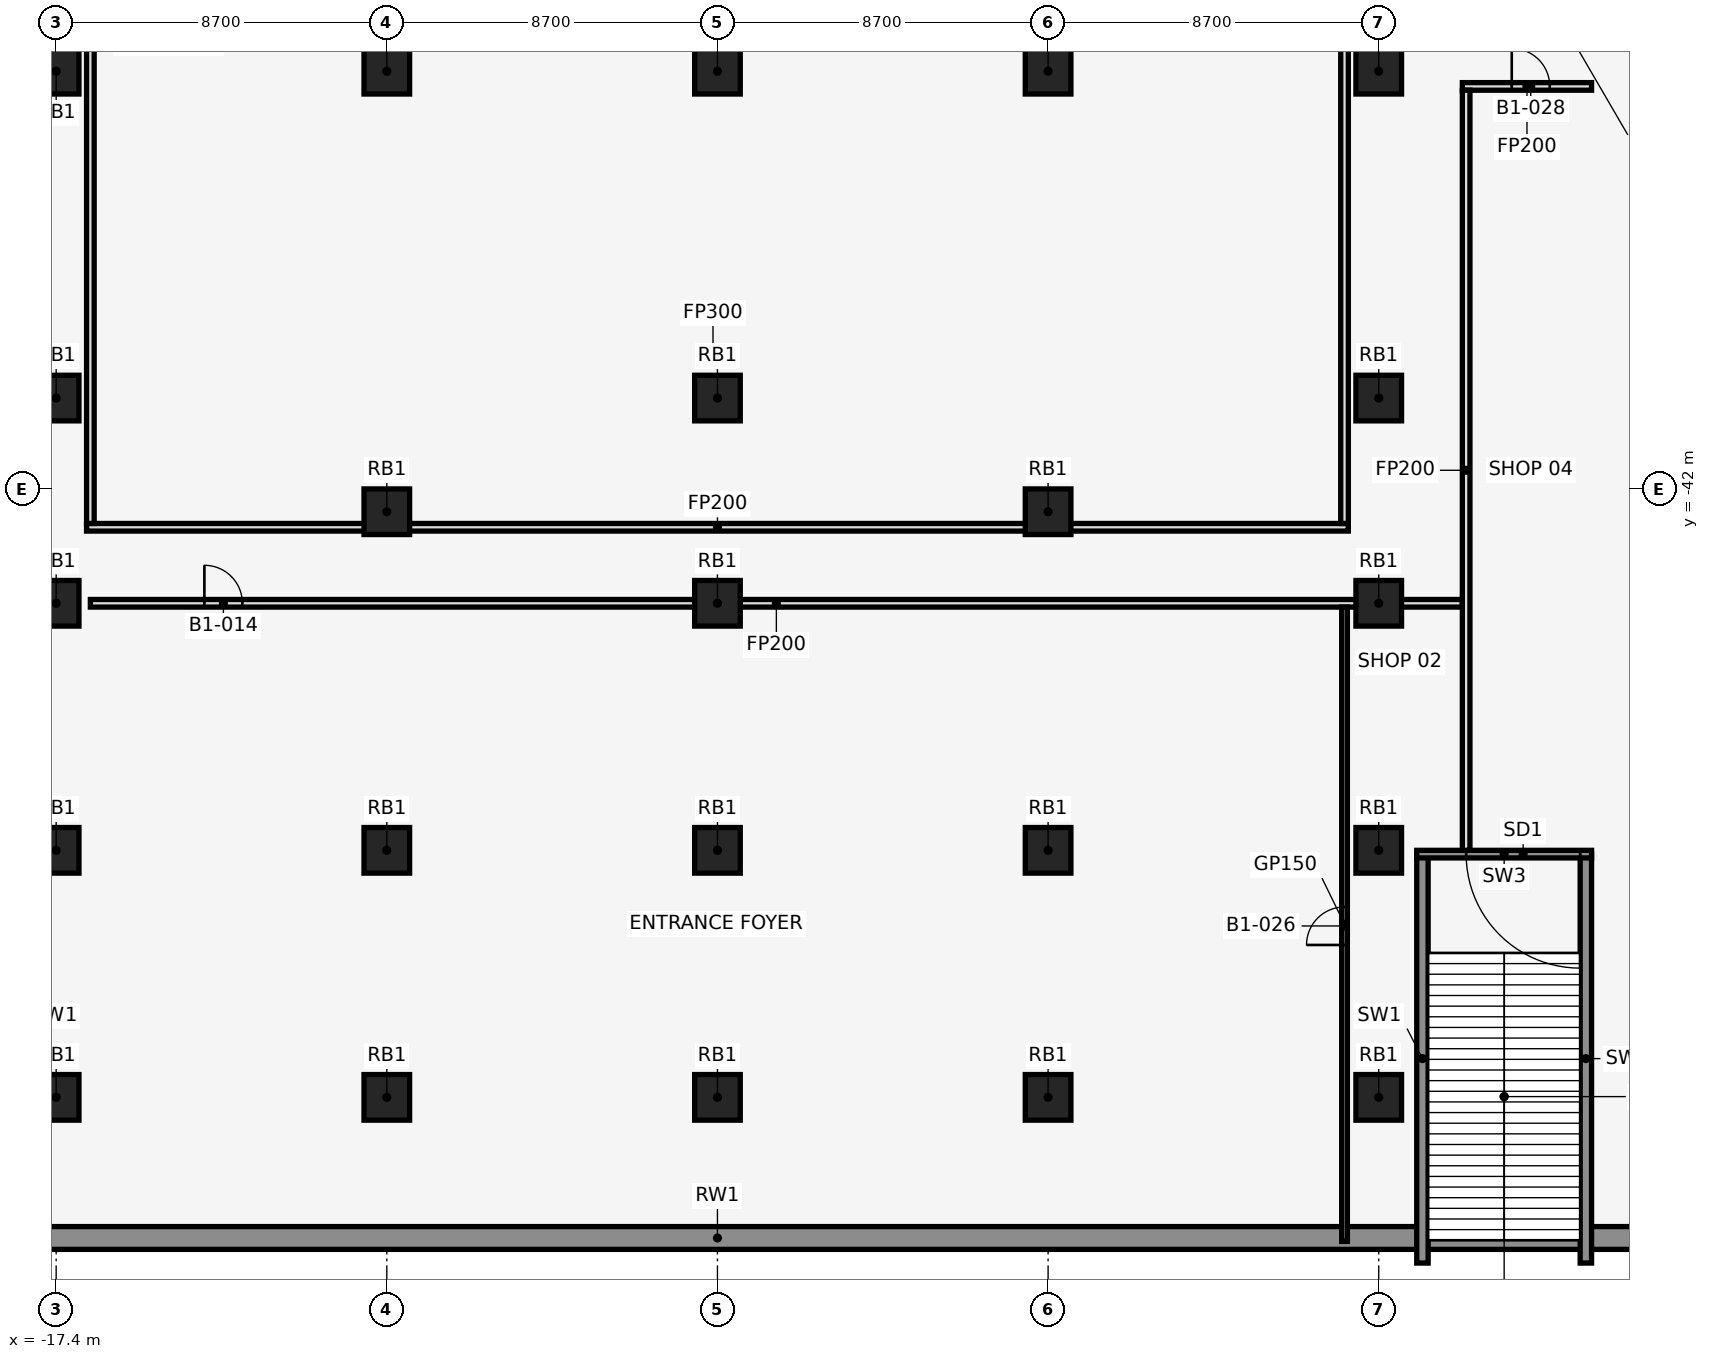
"""IFC4 building model, lengths in metres.
Left out: names, types, materials, properties, quantities, classifications, styles, units other than length and angle.
Written with IfcOpenShell. Run it as: python <this file> out.ifc"""

import sys

from ifc_helpers import new_model, si_unit, direction, frame, frame_2d, origin, origin_2d, place, context, subcontext, project, spatial, polyline, rectangle, outline, extrude, element, fill, save


model = new_model("IFC4")
c1 = context("Model", 3, precision=1e-05, world=origin(), true_north=direction((0.0, 1.0)))
c2 = subcontext(c1, "Body", "Model", "MODEL_VIEW")
j1 = project(units=[si_unit("LENGTHUNIT", "METRE"), si_unit("PLANEANGLEUNIT", "RADIAN")], contexts=[c1])
p1 = place(None, origin())
s1 = spatial("IfcSite", under=j1, at=p1, CompositionType="ELEMENT")
p2 = place(p1, origin())
s2 = spatial("IfcBuilding", under=s1, at=p2, CompositionType="ELEMENT")
p3 = place(p2, frame((0.0, 0.0, -5.0)))
s3 = spatial("IfcBuildingStorey", under=s2, at=p3, CompositionType="ELEMENT", Elevation=-5.0)
for number, where, z_axis, x_axis in (
    (1, (-17.4, -39.6, 0.0), (0.0, 0.0, 1.0), (1.0, 0.0, 0.0)),
    (2, (-8.7, -42.591, 0.0), (0.0, 0.0, 1.0), (1.0, 0.0, 0.0)),
    (3, (0.0, -39.6, 0.0), (0.0, 0.0, 1.0), (1.0, 0.0, 0.0)),
    (4, (8.7, -42.591, 0.0), (0.0, 0.0, 1.0), (1.0, 0.0, 0.0)),
    (5, (17.4, -39.6, 0.0), (0.0, 0.0, 1.0), (1.0, 0.0, 0.0)),
    (6, (-17.4, -31.0, 0.0), (0.0, 0.0, 1.0), (1.0, 0.0, 0.0)),
    (7, (-17.4, -45.0, 0.0), (0.0, 0.0, 1.0), (1.0, 0.0, 0.0)),
    (8, (-17.4, -51.5, 0.0), (0.0, 0.0, 1.0), (1.0, 0.0, 0.0)),
    (9, (-17.4, -58.0, 0.0), (0.0, 0.0, 1.0), (1.0, 0.0, 0.0)),
    (10, (-8.7, -31.0, 0.0), (0.0, 0.0, 1.0), (1.0, 0.0, 0.0)),
    (11, (-8.7, -51.5, 0.0), (0.0, 0.0, 1.0), (1.0, 0.0, 0.0)),
    (12, (-8.7, -58.0, 0.0), (0.0, 0.0, 1.0), (1.0, 0.0, 0.0)),
    (13, (0.0, -31.0, 0.0), (0.0, 0.0, 1.0), (1.0, 0.0, 0.0)),
    (14, (0.0, -45.0, 0.0), (0.0, 0.0, 1.0), (1.0, 0.0, 0.0)),
    (15, (0.0, -51.5, 0.0), (0.0, 0.0, 1.0), (1.0, 0.0, 0.0)),
    (16, (0.0, -58.0, 0.0), (0.0, 0.0, 1.0), (1.0, 0.0, 0.0)),
    (17, (8.7, -31.0, 0.0), (0.0, 0.0, 1.0), (1.0, 0.0, 0.0)),
    (18, (8.7, -51.5, 0.0), (0.0, 0.0, 1.0), (1.0, 0.0, 0.0)),
    (19, (8.7, -58.0, 0.0), (0.0, 0.0, 1.0), (1.0, 0.0, 0.0)),
    (20, (17.4, -31.0, 0.0), (0.0, 0.0, 1.0), (1.0, 0.0, 0.0)),
    (21, (17.4, -45.0, 0.0), (0.0, 0.0, 1.0), (1.0, 0.0, 0.0)),
    (22, (17.4, -51.5, 0.0), (0.0, 0.0, 1.0), (1.0, 0.0, 0.0)),
    (23, (17.4, -58.0, 0.0), (0.0, 0.0, 1.0), (1.0, 0.0, 0.0)),
):
    element("IfcColumn", number, at=place(p3, frame(where, z_axis=z_axis, x_axis=x_axis)), inside=s3, PredefinedType="COLUMN", context=c2, shape_type="SweptSolid", body=[
        extrude(rectangle(XDim=1.2, YDim=1.2, at=origin_2d()), origin(), (0.0, 0.0, 1.0), 5.0),
    ])
p4 = place(p3, frame((-60.0, -61.7, 0.0), z_axis=(0.0, 0.0, 1.0), x_axis=(1.0, 0.0, 0.0)))
e24 = element("IfcWall", 24, at=p4, inside=s3, PredefinedType="SOLIDWALL", context=c2, shape_type="SweptSolid", body=[
    extrude(rectangle(XDim=120.0, YDim=0.6, at=frame_2d((60.0, 0.0))), origin(), (0.0, 0.0, 1.0), 5.0),
])
for number, where, z_axis, x_axis in (
    (25, (18.55, -51.6, 0.0), (0.0, 0.0, 1.0), (0.0, -1.0, 0.0)),
    (26, (22.85, -51.6, 0.0), (0.0, 0.0, 1.0), (0.0, -1.0, 0.0)),
):
    element("IfcWall", number, at=place(p3, frame(where, z_axis=z_axis, x_axis=x_axis)), inside=s3, PredefinedType="STANDARD", context=c2, shape_type="SweptSolid", body=[
        extrude(outline(polyline([(0.0, 0.0), (10.76, 0.0), (10.76, 6.1), (10.16, 6.1), (2.6, 1.1), (0.0, 1.1), (0.0, 0.0)])), frame((0.0, 0.15, 0.0), z_axis=(0.0, -1.0, 0.0), x_axis=(1.0, 0.0, 0.0)), (0.0, 0.0, 1.0), 0.3),
    ])
p5 = place(p3, frame((23.0, -51.6, 0.0), z_axis=(0.0, 0.0, 1.0), x_axis=(-1.0, 0.0, 0.0)))
e27 = element("IfcWall", 27, at=p5, inside=s3, PredefinedType="STANDARD", context=c2, shape_type="SweptSolid", body=[
    extrude(rectangle(XDim=4.6, YDim=0.2, at=frame_2d((2.3, 0.0))), origin(), (0.0, 0.0, 1.0), 4.75),
])
p6 = place(p5, frame((0.3, 0.0, 0.0)))
e28 = element("IfcOpeningElement", 28, at=p6, cuts=e27, PredefinedType="OPENING", context=c2, shape_type="SweptSolid", body=[
    extrude(rectangle(XDim=3.0, YDim=2.4, at=frame_2d((1.5, 1.2))), frame((0.0, 0.112, 0.0), z_axis=(0.0, -1.0, 0.0), x_axis=(1.0, 0.0, 0.0)), (0.0, 0.0, 1.0), 0.224),
])
p7 = place(p3, frame((-16.5, -45.0, 0.0), z_axis=(0.0, 0.0, 1.0), x_axis=(1.0, 0.0, 0.0)))
e29 = element("IfcWall", 29, at=p7, inside=s3, PredefinedType="PARTITIONING", context=c2, shape_type="SweptSolid", body=[
    extrude(rectangle(XDim=36.1, YDim=0.2, at=frame_2d((18.05, 0.0))), origin(), (0.0, 0.0, 1.0), 4.7),
])
p8 = place(p7, frame((3.0, 0.0, 0.0)))
e30 = element("IfcOpeningElement", 30, at=p8, cuts=e29, PredefinedType="OPENING", context=c2, shape_type="SweptSolid", body=[
    extrude(rectangle(XDim=1.0, YDim=2.1, at=frame_2d((0.5, 1.05))), frame((0.0, 0.112, 0.0), z_axis=(0.0, -1.0, 0.0), x_axis=(1.0, 0.0, 0.0)), (0.0, 0.0, 1.0), 0.224),
])
p9 = place(p3, frame((-16.6, -43.0, 0.0), z_axis=(0.0, 0.0, 1.0), x_axis=(1.0, 0.0, 0.0)))
e31 = element("IfcWall", 31, at=p9, inside=s3, PredefinedType="PARTITIONING", context=c2, shape_type="SweptSolid", body=[
    extrude(rectangle(XDim=33.2, YDim=0.2, at=frame_2d((16.6, 0.0))), origin(), (0.0, 0.0, 1.0), 4.7),
])
p10 = place(p3, frame((19.6, -31.4, 0.0), z_axis=(0.0, 0.0, 1.0), x_axis=(1.0, 0.0, 0.0)))
e32 = element("IfcWall", 32, at=p10, inside=s3, PredefinedType="PARTITIONING", context=c2, shape_type="SweptSolid", body=[
    extrude(rectangle(XDim=3.4, YDim=0.2, at=frame_2d((1.7, 0.0))), origin(), (0.0, 0.0, 1.0), 4.7),
])
p11 = place(p10, frame((1.3, 0.0, 0.0)))
e33 = element("IfcOpeningElement", 33, at=p11, cuts=e32, PredefinedType="OPENING", context=c2, shape_type="SweptSolid", body=[
    extrude(rectangle(XDim=1.0, YDim=2.1, at=frame_2d((0.5, 1.05))), frame((0.0, 0.112, 0.0), z_axis=(0.0, -1.0, 0.0), x_axis=(1.0, 0.0, 0.0)), (0.0, 0.0, 1.0), 0.224),
])
p12 = place(p3, frame((-16.5, -42.9, 0.0), z_axis=(0.0, 0.0, 1.0), x_axis=(0.0, 1.0, 0.0)))
e34 = element("IfcWall", 34, at=p12, inside=s3, PredefinedType="PARTITIONING", context=c2, shape_type="SweptSolid", body=[
    extrude(rectangle(XDim=27.4, YDim=0.2, at=frame_2d((13.7, 0.0))), origin(), (0.0, 0.0, 1.0), 4.7),
])
p13 = place(p12, frame((13.2, 0.0, 0.0)))
e35 = element("IfcOpeningElement", 35, at=p13, cuts=e34, PredefinedType="OPENING", context=c2, shape_type="SweptSolid", body=[
    extrude(rectangle(XDim=1.0, YDim=2.1, at=frame_2d((0.5, 1.05))), frame((0.0, 0.112, 0.0), z_axis=(0.0, -1.0, 0.0), x_axis=(1.0, 0.0, 0.0)), (0.0, 0.0, 1.0), 0.224),
])
p14 = place(p3, frame((16.5, -61.79, 0.0), z_axis=(0.0, 0.0, 1.0), x_axis=(0.0, 1.0, 0.0)))
e36 = element("IfcWall", 36, at=p14, inside=s3, PredefinedType="PARTITIONING", context=c2, shape_type="SweptSolid", body=[
    extrude(rectangle(XDim=16.69, YDim=0.15, at=frame_2d((8.345, 0.0))), origin(), (0.0, 0.0, 1.0), 4.7),
])
p15 = place(p14, frame((7.8, 0.0, 0.0)))
e37 = element("IfcOpeningElement", 37, at=p15, cuts=e36, PredefinedType="OPENING", context=c2, shape_type="SweptSolid", body=[
    extrude(rectangle(XDim=1.0, YDim=2.1, at=frame_2d((0.5, 1.05))), frame((0.0, 0.087, 0.0), z_axis=(0.0, -1.0, 0.0), x_axis=(1.0, 0.0, 0.0)), (0.0, 0.0, 1.0), 0.174),
])
p16 = place(p3, frame((16.5, -42.9, 0.0), z_axis=(0.0, 0.0, 1.0), x_axis=(0.0, 1.0, 0.0)))
e38 = element("IfcWall", 38, at=p16, inside=s3, PredefinedType="PARTITIONING", context=c2, shape_type="SweptSolid", body=[
    extrude(rectangle(XDim=27.4, YDim=0.2, at=frame_2d((13.7, 0.0))), origin(), (0.0, 0.0, 1.0), 4.7),
])
p17 = place(p3, frame((19.7, -51.5, 0.0), z_axis=(0.0, 0.0, 1.0), x_axis=(0.0, 1.0, 0.0)))
e39 = element("IfcWall", 39, at=p17, inside=s3, PredefinedType="PARTITIONING", context=c2, shape_type="SweptSolid", body=[
    extrude(rectangle(XDim=20.0, YDim=0.2, at=frame_2d((10.0, 0.0))), origin(), (0.0, 0.0, 1.0), 4.7),
])
p18 = place(p6, origin())
e40 = element("IfcDoor", 40, at=p18, inside=s3, OperationType="SINGLE_SWING_LEFT", PredefinedType="DOOR", context=c2, shape_type="SweptSolid", body=[
    extrude(rectangle(XDim=3.0, YDim=2.4, at=frame_2d((1.5, 1.2))), frame((0.0, 0.025, 0.0), z_axis=(0.0, -1.0, 0.0), x_axis=(1.0, 0.0, 0.0)), (0.0, 0.0, 1.0), 0.05),
])
fill(e28, e40)
p19 = place(p8, frame((1.0, 0.0, 0.0), z_axis=(0.0, 0.0, 1.0), x_axis=(-1.0, 0.0, 0.0)))
e41 = element("IfcDoor", 41, at=p19, inside=s3, OperationType="SINGLE_SWING_RIGHT", PredefinedType="DOOR", context=c2, shape_type="SweptSolid", body=[
    extrude(rectangle(XDim=1.0, YDim=2.1, at=frame_2d((0.5, 1.05))), frame((0.0, 0.025, 0.0), z_axis=(0.0, -1.0, 0.0), x_axis=(1.0, 0.0, 0.0)), (0.0, 0.0, 1.0), 0.05),
])
fill(e30, e41)
p20 = place(p15, frame((1.0, 0.0, 0.0), z_axis=(0.0, 0.0, 1.0), x_axis=(-1.0, 0.0, 0.0)))
e42 = element("IfcDoor", 42, at=p20, inside=s3, OperationType="SINGLE_SWING_RIGHT", PredefinedType="DOOR", context=c2, shape_type="SweptSolid", body=[
    extrude(rectangle(XDim=1.0, YDim=2.1, at=frame_2d((0.5, 1.05))), frame((0.0, 0.025, 0.0), z_axis=(0.0, -1.0, 0.0), x_axis=(1.0, 0.0, 0.0)), (0.0, 0.0, 1.0), 0.05),
])
fill(e37, e42)
p21 = place(p11, frame((1.0, 0.0, 0.0), z_axis=(0.0, 0.0, 1.0), x_axis=(-1.0, 0.0, 0.0)))
e43 = element("IfcDoor", 43, at=p21, inside=s3, OperationType="SINGLE_SWING_LEFT", PredefinedType="DOOR", context=c2, shape_type="SweptSolid", body=[
    extrude(rectangle(XDim=1.0, YDim=2.1, at=frame_2d((0.5, 1.05))), frame((0.0, 0.025, 0.0), z_axis=(0.0, -1.0, 0.0), x_axis=(1.0, 0.0, 0.0)), (0.0, 0.0, 1.0), 0.05),
])
fill(e33, e43)
save(model, sys.argv[1])
